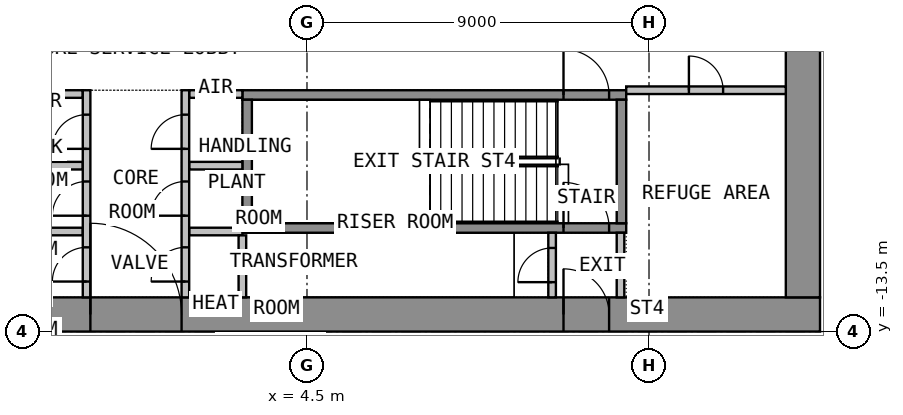
"""IFC4 building model, lengths in metres.
Left out: names, types, materials, properties, quantities, classifications, styles, units other than length and angle.
Written with IfcOpenShell. Run it as: python <this file> out.ifc"""

import sys

from ifc_helpers import new_model, si_unit, direction, frame, frame_2d, origin, place, context, subcontext, project, spatial, rectangle, extrude, element, fill, save


model = new_model("IFC4")
c1 = context("Model", 3, precision=1e-05, world=origin(), true_north=direction((0.0, 1.0)))
c2 = subcontext(c1, "Body", "Model", "MODEL_VIEW")
j1 = project(units=[si_unit("LENGTHUNIT", "METRE"), si_unit("PLANEANGLEUNIT", "RADIAN")], contexts=[c1])
p1 = place(None, origin())
s1 = spatial("IfcSite", under=j1, at=p1, CompositionType="ELEMENT")
p2 = place(p1, origin())
s2 = spatial("IfcBuilding", under=s1, at=p2, CompositionType="ELEMENT")
p3 = place(p2, frame((0.0, 0.0, 76.8)))
s3 = spatial("IfcBuildingStorey", under=s2, at=p3, CompositionType="ELEMENT", Elevation=76.8)
p4 = place(p3, frame((-18.0, -13.05, 0.0), z_axis=(0.0, 0.0, 1.0), x_axis=(1.0, 0.0, 0.0)))
e1 = element("IfcWall", 1, at=p4, inside=s3, PredefinedType="SHEAR", context=c2, shape_type="SweptSolid", body=[
    extrude(rectangle(XDim=36.0, YDim=0.9, at=frame_2d((18.0, 0.0))), origin(), (0.0, 0.0, 1.0), 4.125),
])
p5 = place(p4, frame((16.8, 0.0, 0.0)))
e2 = element("IfcOpeningElement", 2, at=p5, cuts=e1, PredefinedType="OPENING", context=c2, shape_type="SweptSolid", body=[
    extrude(rectangle(XDim=2.4, YDim=2.1, at=frame_2d((1.2, 1.05))), frame((0.0, 0.46, 0.0), z_axis=(0.0, -1.0, 0.0), x_axis=(1.0, 0.0, 0.0)), (0.0, 0.0, 1.0), 0.92),
])
p6 = place(p4, frame((5.55, 0.0, 0.0)))
e3 = element("IfcOpeningElement", 3, at=p6, cuts=e1, PredefinedType="OPENING", context=c2, shape_type="SweptSolid", body=[
    extrude(rectangle(XDim=1.2, YDim=2.1, at=frame_2d((0.6, 1.05))), frame((0.0, 0.46, 0.0), z_axis=(0.0, -1.0, 0.0), x_axis=(1.0, 0.0, 0.0)), (0.0, 0.0, 1.0), 0.92),
])
p7 = place(p4, frame((29.25, 0.0, 0.0)))
e4 = element("IfcOpeningElement", 4, at=p7, cuts=e1, PredefinedType="OPENING", context=c2, shape_type="SweptSolid", body=[
    extrude(rectangle(XDim=1.2, YDim=2.1, at=frame_2d((0.6, 1.05))), frame((0.0, 0.46, 0.0), z_axis=(0.0, -1.0, 0.0), x_axis=(1.0, 0.0, 0.0)), (0.0, 0.0, 1.0), 0.92),
])
p8 = place(p3, frame((17.55, -12.6, 0.0), z_axis=(0.0, 0.0, 1.0), x_axis=(0.0, 1.0, 0.0)))
e5 = element("IfcWall", 5, at=p8, inside=s3, PredefinedType="SHEAR", context=c2, shape_type="SweptSolid", body=[
    extrude(rectangle(XDim=25.2, YDim=0.9, at=frame_2d((12.6, 0.0))), origin(), (0.0, 0.0, 1.0), 4.125),
])
p9 = place(p8, frame((11.4, 0.0, 0.0)))
e6 = element("IfcOpeningElement", 6, at=p9, cuts=e5, PredefinedType="OPENING", context=c2, shape_type="SweptSolid", body=[
    extrude(rectangle(XDim=2.4, YDim=2.1, at=frame_2d((1.2, 1.05))), frame((0.0, 0.46, 0.0), z_axis=(0.0, -1.0, 0.0), x_axis=(1.0, 0.0, 0.0)), (0.0, 0.0, 1.0), 0.92),
])
p10 = place(p3, frame((2.8, -10.775, 0.0), z_axis=(0.0, 0.0, 1.0), x_axis=(1.0, 0.0, 0.0)))
e7 = element("IfcWall", 7, at=p10, inside=s3, PredefinedType="SHEAR", context=c2, shape_type="SweptSolid", body=[
    extrude(rectangle(XDim=10.1, YDim=0.25, at=frame_2d((5.05, 0.0))), origin(), (0.0, 0.0, 1.0), 4.125),
])
p11 = place(p10, frame((8.45, 0.0, 0.0)))
e8 = element("IfcOpeningElement", 8, at=p11, cuts=e7, PredefinedType="OPENING", context=c2, shape_type="SweptSolid", body=[
    extrude(rectangle(XDim=1.2, YDim=2.1, at=frame_2d((0.6, 1.05))), frame((0.0, 0.135, 0.0), z_axis=(0.0, -1.0, 0.0), x_axis=(1.0, 0.0, 0.0)), (0.0, 0.0, 1.0), 0.27),
])
p12 = place(p3, frame((2.8, -7.275, 0.0), z_axis=(0.0, 0.0, 1.0), x_axis=(1.0, 0.0, 0.0)))
e9 = element("IfcWall", 9, at=p12, inside=s3, PredefinedType="SHEAR", context=c2, shape_type="SweptSolid", body=[
    extrude(rectangle(XDim=10.1, YDim=0.25, at=frame_2d((5.05, 0.0))), origin(), (0.0, 0.0, 1.0), 4.125),
])
p13 = place(p12, frame((8.45, 0.0, 0.0)))
e10 = element("IfcOpeningElement", 10, at=p13, cuts=e9, PredefinedType="OPENING", context=c2, shape_type="SweptSolid", body=[
    extrude(rectangle(XDim=1.2, YDim=2.1, at=frame_2d((0.6, 1.05))), frame((0.0, 0.135, 0.0), z_axis=(0.0, -1.0, 0.0), x_axis=(1.0, 0.0, 0.0)), (0.0, 0.0, 1.0), 0.27),
])
for number, where, z_axis, x_axis in (
    (11, (2.925, -10.65, 0.0), (0.0, 0.0, 1.0), (0.0, 1.0, 0.0)),
    (12, (12.775, -10.65, 0.0), (0.0, 0.0, 1.0), (0.0, 1.0, 0.0)),
):
    element("IfcWall", number, at=place(p3, frame(where, z_axis=z_axis, x_axis=x_axis)), inside=s3, PredefinedType="SHEAR", context=c2, shape_type="SweptSolid", body=[
        extrude(rectangle(XDim=3.25, YDim=0.25, at=frame_2d((1.625, 0.0))), origin(), (0.0, 0.0, 1.0), 4.125),
    ])
for number, where, z_axis, x_axis in (
    (13, (-2.8, -7.25, 0.0), (0.0, 0.0, 1.0), (1.0, 0.0, 0.0)),
    (14, (-2.8, -9.135, 0.0), (0.0, 0.0, 1.0), (1.0, 0.0, 0.0)),
    (15, (-2.8, -10.867, 0.0), (0.0, 0.0, 1.0), (1.0, 0.0, 0.0)),
    (16, (1.4, -7.25, 0.0), (0.0, 0.0, 1.0), (1.0, 0.0, 0.0)),
    (17, (1.4, -9.135, 0.0), (0.0, 0.0, 1.0), (1.0, 0.0, 0.0)),
    (18, (1.4, -10.867, 0.0), (0.0, 0.0, 1.0), (1.0, 0.0, 0.0)),
):
    element("IfcWall", number, at=place(p3, frame(where, z_axis=z_axis, x_axis=x_axis)), inside=s3, PredefinedType="PARTITIONING", context=c2, shape_type="SweptSolid", body=[
        extrude(rectangle(XDim=1.4, YDim=0.2, at=frame_2d((0.7, 0.0))), origin(), (0.0, 0.0, 1.0), 4.125),
    ])
p14 = place(p3, frame((-1.3, -12.6, 0.0), z_axis=(0.0, 0.0, 1.0), x_axis=(0.0, 1.0, 0.0)))
e19 = element("IfcWall", 19, at=p14, inside=s3, PredefinedType="PARTITIONING", context=c2, shape_type="SweptSolid", body=[
    extrude(rectangle(XDim=5.45, YDim=0.2, at=frame_2d((2.725, 0.0))), origin(), (0.0, 0.0, 1.0), 4.125),
])
p15 = place(p14, frame((0.416, 0.0, 0.0)))
e20 = element("IfcOpeningElement", 20, at=p15, cuts=e19, PredefinedType="OPENING", context=c2, shape_type="SweptSolid", body=[
    extrude(rectangle(XDim=0.9, YDim=2.1, at=frame_2d((0.45, 1.05))), frame((0.0, 0.11, 0.0), z_axis=(0.0, -1.0, 0.0), x_axis=(1.0, 0.0, 0.0)), (0.0, 0.0, 1.0), 0.22),
])
p16 = place(p14, frame((2.149, 0.0, 0.0)))
e21 = element("IfcOpeningElement", 21, at=p16, cuts=e19, PredefinedType="OPENING", context=c2, shape_type="SweptSolid", body=[
    extrude(rectangle(XDim=0.9, YDim=2.1, at=frame_2d((0.45, 1.05))), frame((0.0, 0.11, 0.0), z_axis=(0.0, -1.0, 0.0), x_axis=(1.0, 0.0, 0.0)), (0.0, 0.0, 1.0), 0.22),
])
p17 = place(p14, frame((3.907, 0.0, 0.0)))
e22 = element("IfcOpeningElement", 22, at=p17, cuts=e19, PredefinedType="OPENING", context=c2, shape_type="SweptSolid", body=[
    extrude(rectangle(XDim=0.9, YDim=2.1, at=frame_2d((0.45, 1.05))), frame((0.0, 0.11, 0.0), z_axis=(0.0, -1.0, 0.0), x_axis=(1.0, 0.0, 0.0)), (0.0, 0.0, 1.0), 0.22),
])
p18 = place(p3, frame((1.3, -12.6, 0.0), z_axis=(0.0, 0.0, 1.0), x_axis=(0.0, 1.0, 0.0)))
e23 = element("IfcWall", 23, at=p18, inside=s3, PredefinedType="PARTITIONING", context=c2, shape_type="SweptSolid", body=[
    extrude(rectangle(XDim=5.45, YDim=0.2, at=frame_2d((2.725, 0.0))), origin(), (0.0, 0.0, 1.0), 4.125),
])
p19 = place(p18, frame((0.416, 0.0, 0.0)))
e24 = element("IfcOpeningElement", 24, at=p19, cuts=e23, PredefinedType="OPENING", context=c2, shape_type="SweptSolid", body=[
    extrude(rectangle(XDim=0.9, YDim=2.1, at=frame_2d((0.45, 1.05))), frame((0.0, 0.11, 0.0), z_axis=(0.0, -1.0, 0.0), x_axis=(1.0, 0.0, 0.0)), (0.0, 0.0, 1.0), 0.22),
])
p20 = place(p18, frame((2.149, 0.0, 0.0)))
e25 = element("IfcOpeningElement", 25, at=p20, cuts=e23, PredefinedType="OPENING", context=c2, shape_type="SweptSolid", body=[
    extrude(rectangle(XDim=0.9, YDim=2.1, at=frame_2d((0.45, 1.05))), frame((0.0, 0.11, 0.0), z_axis=(0.0, -1.0, 0.0), x_axis=(1.0, 0.0, 0.0)), (0.0, 0.0, 1.0), 0.22),
])
p21 = place(p18, frame((3.907, 0.0, 0.0)))
e26 = element("IfcOpeningElement", 26, at=p21, cuts=e23, PredefinedType="OPENING", context=c2, shape_type="SweptSolid", body=[
    extrude(rectangle(XDim=0.9, YDim=2.1, at=frame_2d((0.45, 1.05))), frame((0.0, 0.11, 0.0), z_axis=(0.0, -1.0, 0.0), x_axis=(1.0, 0.0, 0.0)), (0.0, 0.0, 1.0), 0.22),
])
p22 = place(p3, frame((12.75, -12.6, 0.0), z_axis=(0.0, 0.0, 1.0), x_axis=(0.0, 1.0, 0.0)))
e27 = element("IfcWall", 27, at=p22, inside=s3, PredefinedType="PARTITIONING", context=c2, shape_type="SweptSolid", body=[
    extrude(rectangle(XDim=1.7, YDim=0.2, at=frame_2d((0.85, 0.0))), origin(), (0.0, 0.0, 1.0), 4.125),
])
p23 = place(p3, frame((10.95, -12.6, 0.0), z_axis=(0.0, 0.0, 1.0), x_axis=(0.0, 1.0, 0.0)))
e28 = element("IfcWall", 28, at=p23, inside=s3, PredefinedType="PARTITIONING", context=c2, shape_type="SweptSolid", body=[
    extrude(rectangle(XDim=1.7, YDim=0.2, at=frame_2d((0.85, 0.0))), origin(), (0.0, 0.0, 1.0), 4.125),
])
p24 = place(p23, frame((0.4, 0.0, 0.0)))
e29 = element("IfcOpeningElement", 29, at=p24, cuts=e28, PredefinedType="OPENING", context=c2, shape_type="SweptSolid", body=[
    extrude(rectangle(XDim=0.9, YDim=2.1, at=frame_2d((0.45, 1.05))), frame((0.0, 0.11, 0.0), z_axis=(0.0, -1.0, 0.0), x_axis=(1.0, 0.0, 0.0)), (0.0, 0.0, 1.0), 0.22),
])
p25 = place(p3, frame((12.9, -7.15, 0.0), z_axis=(0.0, 0.0, 1.0), x_axis=(1.0, 0.0, 0.0)))
e30 = element("IfcWall", 30, at=p25, inside=s3, PredefinedType="PARTITIONING", context=c2, shape_type="SweptSolid", body=[
    extrude(rectangle(XDim=4.2, YDim=0.2, at=frame_2d((2.1, 0.0))), origin(), (0.0, 0.0, 1.0), 4.125),
])
p26 = place(p25, frame((1.65, 0.0, 0.0)))
e31 = element("IfcOpeningElement", 31, at=p26, cuts=e30, PredefinedType="OPENING", context=c2, shape_type="SweptSolid", body=[
    extrude(rectangle(XDim=0.9, YDim=2.1, at=frame_2d((0.45, 1.05))), frame((0.0, 0.11, 0.0), z_axis=(0.0, -1.0, 0.0), x_axis=(1.0, 0.0, 0.0)), (0.0, 0.0, 1.0), 0.22),
])
p27 = place(p3, frame((2.8, -10.969, 0.0), z_axis=(0.0, 0.0, 1.0), x_axis=(0.0, -1.0, 0.0)))
e32 = element("IfcWall", 32, at=p27, inside=s3, PredefinedType="PARTITIONING", context=c2, shape_type="SweptSolid", body=[
    extrude(rectangle(XDim=1.631, YDim=0.2, at=frame_2d((0.815, 0.0))), origin(), (0.0, 0.0, 1.0), 4.125),
])
p28 = place(p5, origin())
e33 = element("IfcDoor", 33, at=p28, inside=s3, OperationType="DOUBLE_DOOR_DOUBLE_SWING", PredefinedType="DOOR", context=c2, shape_type="SweptSolid", body=[
    extrude(rectangle(XDim=2.4, YDim=2.1, at=frame_2d((1.2, 1.05))), frame((0.0, 0.025, 0.0), z_axis=(0.0, -1.0, 0.0), x_axis=(1.0, 0.0, 0.0)), (0.0, 0.0, 1.0), 0.05),
])
fill(e2, e33)
p29 = place(p7, origin())
e34 = element("IfcDoor", 34, at=p29, inside=s3, OperationType="SINGLE_SWING_RIGHT", PredefinedType="DOOR", context=c2, shape_type="SweptSolid", body=[
    extrude(rectangle(XDim=1.2, YDim=2.1, at=frame_2d((0.6, 1.05))), frame((0.0, 0.025, 0.0), z_axis=(0.0, -1.0, 0.0), x_axis=(1.0, 0.0, 0.0)), (0.0, 0.0, 1.0), 0.05),
])
fill(e4, e34)
p30 = place(p13, origin())
e35 = element("IfcDoor", 35, at=p30, inside=s3, OperationType="SINGLE_SWING_LEFT", PredefinedType="DOOR", context=c2, shape_type="SweptSolid", body=[
    extrude(rectangle(XDim=1.2, YDim=2.1, at=frame_2d((0.6, 1.05))), frame((0.0, 0.025, 0.0), z_axis=(0.0, -1.0, 0.0), x_axis=(1.0, 0.0, 0.0)), (0.0, 0.0, 1.0), 0.05),
])
fill(e10, e35)
p31 = place(p15, origin())
e36 = element("IfcDoor", 36, at=p31, inside=s3, OperationType="SINGLE_SWING_LEFT", PredefinedType="DOOR", context=c2, shape_type="SweptSolid", body=[
    extrude(rectangle(XDim=0.9, YDim=2.1, at=frame_2d((0.45, 1.05))), frame((0.0, 0.025, 0.0), z_axis=(0.0, -1.0, 0.0), x_axis=(1.0, 0.0, 0.0)), (0.0, 0.0, 1.0), 0.05),
])
fill(e20, e36)
p32 = place(p16, origin())
e37 = element("IfcDoor", 37, at=p32, inside=s3, OperationType="SINGLE_SWING_LEFT", PredefinedType="DOOR", context=c2, shape_type="SweptSolid", body=[
    extrude(rectangle(XDim=0.9, YDim=2.1, at=frame_2d((0.45, 1.05))), frame((0.0, 0.025, 0.0), z_axis=(0.0, -1.0, 0.0), x_axis=(1.0, 0.0, 0.0)), (0.0, 0.0, 1.0), 0.05),
])
fill(e21, e37)
p33 = place(p17, origin())
e38 = element("IfcDoor", 38, at=p33, inside=s3, OperationType="SINGLE_SWING_LEFT", PredefinedType="DOOR", context=c2, shape_type="SweptSolid", body=[
    extrude(rectangle(XDim=0.9, YDim=2.1, at=frame_2d((0.45, 1.05))), frame((0.0, 0.025, 0.0), z_axis=(0.0, -1.0, 0.0), x_axis=(1.0, 0.0, 0.0)), (0.0, 0.0, 1.0), 0.05),
])
fill(e22, e38)
p34 = place(p19, origin())
e39 = element("IfcDoor", 39, at=p34, inside=s3, OperationType="SINGLE_SWING_LEFT", PredefinedType="DOOR", context=c2, shape_type="SweptSolid", body=[
    extrude(rectangle(XDim=0.9, YDim=2.1, at=frame_2d((0.45, 1.05))), frame((0.0, 0.025, 0.0), z_axis=(0.0, -1.0, 0.0), x_axis=(1.0, 0.0, 0.0)), (0.0, 0.0, 1.0), 0.05),
])
fill(e24, e39)
p35 = place(p20, origin())
e40 = element("IfcDoor", 40, at=p35, inside=s3, OperationType="SINGLE_SWING_LEFT", PredefinedType="DOOR", context=c2, shape_type="SweptSolid", body=[
    extrude(rectangle(XDim=0.9, YDim=2.1, at=frame_2d((0.45, 1.05))), frame((0.0, 0.025, 0.0), z_axis=(0.0, -1.0, 0.0), x_axis=(1.0, 0.0, 0.0)), (0.0, 0.0, 1.0), 0.05),
])
fill(e25, e40)
p36 = place(p21, origin())
e41 = element("IfcDoor", 41, at=p36, inside=s3, OperationType="SINGLE_SWING_LEFT", PredefinedType="DOOR", context=c2, shape_type="SweptSolid", body=[
    extrude(rectangle(XDim=0.9, YDim=2.1, at=frame_2d((0.45, 1.05))), frame((0.0, 0.025, 0.0), z_axis=(0.0, -1.0, 0.0), x_axis=(1.0, 0.0, 0.0)), (0.0, 0.0, 1.0), 0.05),
])
fill(e26, e41)
p37 = place(p11, origin())
e42 = element("IfcDoor", 42, at=p37, inside=s3, OperationType="SINGLE_SWING_RIGHT", PredefinedType="DOOR", context=c2, shape_type="SweptSolid", body=[
    extrude(rectangle(XDim=1.2, YDim=2.1, at=frame_2d((0.6, 1.05))), frame((0.0, 0.025, 0.0), z_axis=(0.0, -1.0, 0.0), x_axis=(1.0, 0.0, 0.0)), (0.0, 0.0, 1.0), 0.05),
])
fill(e8, e42)
p38 = place(p24, origin())
e43 = element("IfcDoor", 43, at=p38, inside=s3, OperationType="SINGLE_SWING_LEFT", PredefinedType="DOOR", context=c2, shape_type="SweptSolid", body=[
    extrude(rectangle(XDim=0.9, YDim=2.1, at=frame_2d((0.45, 1.05))), frame((0.0, 0.025, 0.0), z_axis=(0.0, -1.0, 0.0), x_axis=(1.0, 0.0, 0.0)), (0.0, 0.0, 1.0), 0.05),
])
fill(e29, e43)
p39 = place(p26, origin())
e44 = element("IfcDoor", 44, at=p39, inside=s3, OperationType="SINGLE_SWING_LEFT", PredefinedType="DOOR", context=c2, shape_type="SweptSolid", body=[
    extrude(rectangle(XDim=0.9, YDim=2.1, at=frame_2d((0.45, 1.05))), frame((0.0, 0.025, 0.0), z_axis=(0.0, -1.0, 0.0), x_axis=(1.0, 0.0, 0.0)), (0.0, 0.0, 1.0), 0.05),
])
fill(e31, e44)
save(model, sys.argv[1])
